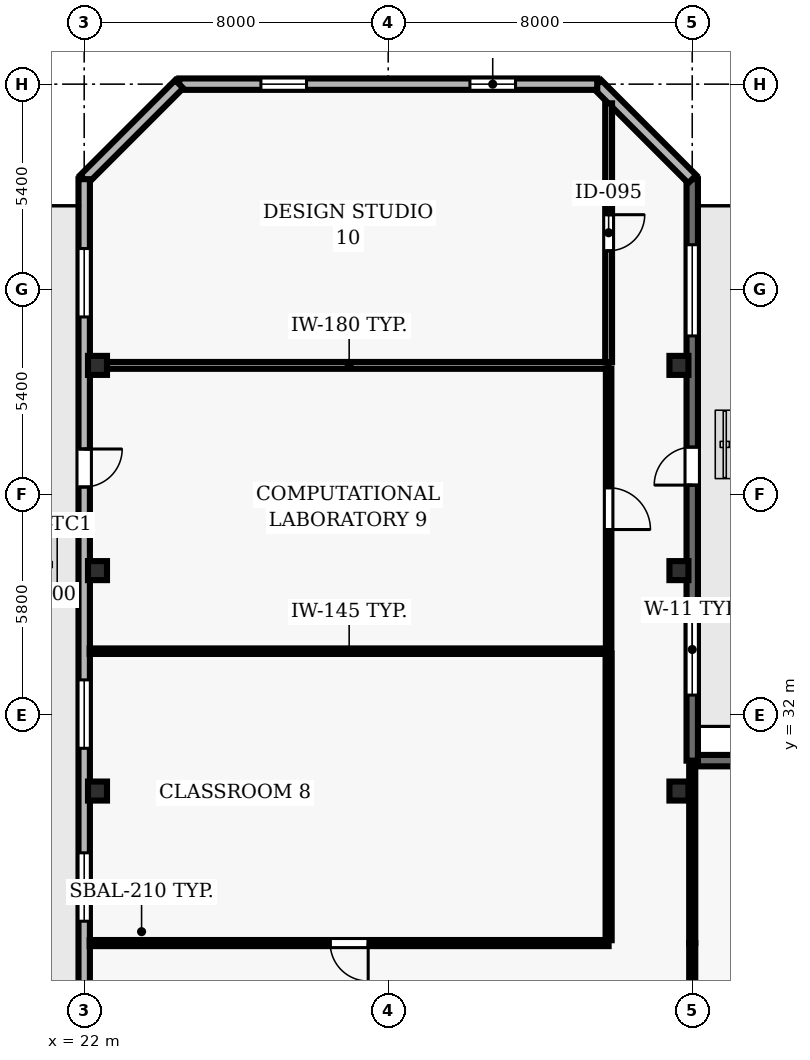
"""IFC4 building model, lengths in metres.
Left out: names, types, materials, properties, quantities, classifications, styles, units other than length and angle.
Written with IfcOpenShell. Run it as: python <this file> out.ifc"""

import sys

from ifc_helpers import new_model, si_unit, direction, frame, frame_2d, origin, origin_2d, place, context, subcontext, project, spatial, rectangle, hollow_rectangle, extrude, element, fill, save


model = new_model("IFC4")
c1 = context("Model", 3, precision=1e-05, world=origin(), true_north=direction((0.0, 1.0)))
c2 = subcontext(c1, "Body", "Model", "MODEL_VIEW")
j1 = project(units=[si_unit("LENGTHUNIT", "METRE"), si_unit("PLANEANGLEUNIT", "RADIAN")], contexts=[c1])
p1 = place(None, origin())
s1 = spatial("IfcSite", under=j1, at=p1, CompositionType="ELEMENT")
p2 = place(p1, origin())
s2 = spatial("IfcBuilding", under=s1, at=p2, CompositionType="ELEMENT")
p3 = place(p2, frame((0.0, 0.0, 111.2)))
s3 = spatial("IfcBuildingStorey", under=s2, at=p3, CompositionType="ELEMENT", Elevation=111.2)
for number, where, z_axis, x_axis in (
    (1, (22.35, 30.0, 0.0), (0.0, 0.0, 1.0), (1.0, 0.0, 0.0)),
    (2, (37.65, 30.0, 0.0), (0.0, 0.0, 1.0), (1.0, 0.0, 0.0)),
    (3, (22.35, 35.8, 0.0), (0.0, 0.0, 1.0), (1.0, 0.0, 0.0)),
    (4, (37.65, 35.8, 0.0), (0.0, 0.0, 1.0), (1.0, 0.0, 0.0)),
    (5, (22.35, 41.2, 0.0), (0.0, 0.0, 1.0), (1.0, 0.0, 0.0)),
    (6, (37.65, 41.2, 0.0), (0.0, 0.0, 1.0), (1.0, 0.0, 0.0)),
):
    element("IfcColumn", number, at=place(p3, frame(where, z_axis=z_axis, x_axis=x_axis)), inside=s3, PredefinedType="COLUMN", context=c2, shape_type="SweptSolid", body=[
        extrude(hollow_rectangle(XDim=0.5, YDim=0.5, WallThickness=0.025, at=origin_2d()), origin(), (0.0, 0.0, 1.0), 3.9),
    ])
p4 = place(p3, frame((47.456, 30.8, 0.0), z_axis=(0.0, 0.0, 1.0), x_axis=(-1.0, 0.0, 0.0)))
e7 = element("IfcWall", 7, at=p4, inside=s3, PredefinedType="SOLIDWALL", context=c2, shape_type="SweptSolid", body=[
    extrude(rectangle(XDim=9.456, YDim=0.3, at=frame_2d((4.728, 0.0))), origin(), (0.0, 0.0, 1.0), 3.69),
])
p5 = place(p4, frame((3.828, 0.0, 0.9)))
e8 = element("IfcOpeningElement", 8, at=p5, cuts=e7, PredefinedType="OPENING", context=c2, shape_type="SweptSolid", body=[
    extrude(rectangle(XDim=1.8, YDim=2.2, at=frame_2d((0.9, 1.1))), frame((0.0, 0.16, 0.0), z_axis=(0.0, -1.0, 0.0), x_axis=(1.0, 0.0, 0.0)), (0.0, 0.0, 1.0), 0.32),
])
p6 = place(p3, frame((38.0, 30.8, 0.0), z_axis=(0.0, 0.0, 1.0), x_axis=(0.0, 1.0, 0.0)))
e9 = element("IfcWall", 9, at=p6, inside=s3, PredefinedType="SOLIDWALL", context=c2, shape_type="SweptSolid", body=[
    extrude(rectangle(XDim=15.3, YDim=0.3, at=frame_2d((7.65, 0.0))), origin(), (0.0, 0.0, 1.0), 3.69),
])
p7 = place(p6, frame((7.25, 0.0, 0.0)))
e10 = element("IfcOpeningElement", 10, at=p7, cuts=e9, PredefinedType="OPENING", context=c2, shape_type="SweptSolid", body=[
    extrude(rectangle(XDim=1.0, YDim=2.2, at=frame_2d((0.5, 1.1))), frame((0.0, 0.16, 0.0), z_axis=(0.0, -1.0, 0.0), x_axis=(1.0, 0.0, 0.0)), (0.0, 0.0, 1.0), 0.32),
])
p8 = place(p6, frame((1.725, 0.0, 0.9)))
e11 = element("IfcOpeningElement", 11, at=p8, cuts=e9, PredefinedType="OPENING", context=c2, shape_type="SweptSolid", body=[
    extrude(rectangle(XDim=2.4, YDim=2.2, at=frame_2d((1.2, 1.1))), frame((0.0, 0.16, 0.0), z_axis=(0.0, -1.0, 0.0), x_axis=(1.0, 0.0, 0.0)), (0.0, 0.0, 1.0), 0.32),
])
p9 = place(p6, frame((11.175, 0.0, 0.9)))
e12 = element("IfcOpeningElement", 12, at=p9, cuts=e9, PredefinedType="OPENING", context=c2, shape_type="SweptSolid", body=[
    extrude(rectangle(XDim=2.4, YDim=2.2, at=frame_2d((1.2, 1.1))), frame((0.0, 0.16, 0.0), z_axis=(0.0, -1.0, 0.0), x_axis=(1.0, 0.0, 0.0)), (0.0, 0.0, 1.0), 0.32),
])
p10 = place(p3, frame((38.0, 46.1, 0.0), z_axis=(0.0, 0.0, 1.0), x_axis=(-0.707106781187, 0.707106781187, 0.0)))
e13 = element("IfcWall", 13, at=p10, inside=s3, PredefinedType="SOLIDWALL", context=c2, shape_type="SweptSolid", body=[
    extrude(rectangle(XDim=3.536, YDim=0.3, at=frame_2d((1.768, 0.0))), origin(), (0.0, 0.0, 1.0), 3.69),
])
p11 = place(p3, frame((35.5, 48.6, 0.0), z_axis=(0.0, 0.0, 1.0), x_axis=(-1.0, 0.0, 0.0)))
e14 = element("IfcWall", 14, at=p11, inside=s3, PredefinedType="SOLIDWALL", context=c2, shape_type="SweptSolid", body=[
    extrude(rectangle(XDim=11.0, YDim=0.3, at=frame_2d((5.5, 0.0))), origin(), (0.0, 0.0, 1.0), 3.69),
])
p12 = place(p11, frame((2.15, 0.0, 0.9)))
e15 = element("IfcOpeningElement", 15, at=p12, cuts=e14, PredefinedType="OPENING", context=c2, shape_type="SweptSolid", body=[
    extrude(rectangle(XDim=1.2, YDim=1.6, at=frame_2d((0.6, 0.8))), frame((0.0, 0.16, 0.0), z_axis=(0.0, -1.0, 0.0), x_axis=(1.0, 0.0, 0.0)), (0.0, 0.0, 1.0), 0.32),
])
p13 = place(p11, frame((7.65, 0.0, 0.9)))
e16 = element("IfcOpeningElement", 16, at=p13, cuts=e14, PredefinedType="OPENING", context=c2, shape_type="SweptSolid", body=[
    extrude(rectangle(XDim=1.2, YDim=1.6, at=frame_2d((0.6, 0.8))), frame((0.0, 0.16, 0.0), z_axis=(0.0, -1.0, 0.0), x_axis=(1.0, 0.0, 0.0)), (0.0, 0.0, 1.0), 0.32),
])
p14 = place(p3, frame((24.5, 48.6, 0.0), z_axis=(0.0, 0.0, 1.0), x_axis=(-0.707106781187, -0.707106781187, 0.0)))
e17 = element("IfcWall", 17, at=p14, inside=s3, PredefinedType="SOLIDWALL", context=c2, shape_type="SweptSolid", body=[
    extrude(rectangle(XDim=3.536, YDim=0.3, at=frame_2d((1.768, 0.0))), origin(), (0.0, 0.0, 1.0), 3.69),
])
p15 = place(p3, frame((22.0, 46.1, 0.0), z_axis=(0.0, 0.0, 1.0), x_axis=(0.0, -1.0, 0.0)))
e18 = element("IfcWall", 18, at=p15, inside=s3, PredefinedType="SOLIDWALL", context=c2, shape_type="SweptSolid", body=[
    extrude(rectangle(XDim=43.6, YDim=0.3, at=frame_2d((21.8, 0.0))), origin(), (0.0, 0.0, 1.0), 3.69),
])
p16 = place(p15, frame((7.1, 0.0, 0.0)))
e19 = element("IfcOpeningElement", 19, at=p16, cuts=e18, PredefinedType="OPENING", context=c2, shape_type="SweptSolid", body=[
    extrude(rectangle(XDim=1.0, YDim=2.2, at=frame_2d((0.5, 1.1))), frame((0.0, 0.16, 0.0), z_axis=(0.0, -1.0, 0.0), x_axis=(1.0, 0.0, 0.0)), (0.0, 0.0, 1.0), 0.32),
])
p17 = place(p15, frame((1.825, 0.0, 0.9)))
e20 = element("IfcOpeningElement", 20, at=p17, cuts=e18, PredefinedType="OPENING", context=c2, shape_type="SweptSolid", body=[
    extrude(rectangle(XDim=1.8, YDim=1.6, at=frame_2d((0.9, 0.8))), frame((0.0, 0.16, 0.0), z_axis=(0.0, -1.0, 0.0), x_axis=(1.0, 0.0, 0.0)), (0.0, 0.0, 1.0), 0.32),
])
p18 = place(p15, frame((13.175, 0.0, 0.9)))
e21 = element("IfcOpeningElement", 21, at=p18, cuts=e18, PredefinedType="OPENING", context=c2, shape_type="SweptSolid", body=[
    extrude(rectangle(XDim=1.8, YDim=1.6, at=frame_2d((0.9, 0.8))), frame((0.0, 0.16, 0.0), z_axis=(0.0, -1.0, 0.0), x_axis=(1.0, 0.0, 0.0)), (0.0, 0.0, 1.0), 0.32),
])
p19 = place(p15, frame((17.725, 0.0, 0.9)))
e22 = element("IfcOpeningElement", 22, at=p19, cuts=e18, PredefinedType="OPENING", context=c2, shape_type="SweptSolid", body=[
    extrude(rectangle(XDim=1.8, YDim=1.6, at=frame_2d((0.9, 0.8))), frame((0.0, 0.16, 0.0), z_axis=(0.0, -1.0, 0.0), x_axis=(1.0, 0.0, 0.0)), (0.0, 0.0, 1.0), 0.32),
])
p20 = place(p15, frame((23.625, 0.0, 0.9)))
e23 = element("IfcOpeningElement", 23, at=p20, cuts=e18, PredefinedType="OPENING", context=c2, shape_type="SweptSolid", body=[
    extrude(rectangle(XDim=1.8, YDim=1.6, at=frame_2d((0.9, 0.8))), frame((0.0, 0.16, 0.0), z_axis=(0.0, -1.0, 0.0), x_axis=(1.0, 0.0, 0.0)), (0.0, 0.0, 1.0), 0.32),
])
p21 = place(p15, frame((28.625, 0.0, 0.9)))
e24 = element("IfcOpeningElement", 24, at=p21, cuts=e18, PredefinedType="OPENING", context=c2, shape_type="SweptSolid", body=[
    extrude(rectangle(XDim=1.8, YDim=1.6, at=frame_2d((0.9, 0.8))), frame((0.0, 0.16, 0.0), z_axis=(0.0, -1.0, 0.0), x_axis=(1.0, 0.0, 0.0)), (0.0, 0.0, 1.0), 0.32),
])
p22 = place(p15, frame((34.525, 0.0, 0.9)))
e25 = element("IfcOpeningElement", 25, at=p22, cuts=e18, PredefinedType="OPENING", context=c2, shape_type="SweptSolid", body=[
    extrude(rectangle(XDim=1.8, YDim=1.6, at=frame_2d((0.9, 0.8))), frame((0.0, 0.16, 0.0), z_axis=(0.0, -1.0, 0.0), x_axis=(1.0, 0.0, 0.0)), (0.0, 0.0, 1.0), 0.32),
])
p23 = place(p3, frame((35.8, 26.0, 0.0), z_axis=(0.0, 0.0, 1.0), x_axis=(-1.0, 0.0, 0.0)))
e26 = element("IfcWall", 26, at=p23, inside=s3, PredefinedType="PARTITIONING", context=c2, shape_type="SweptSolid", body=[
    extrude(rectangle(XDim=13.655, YDim=0.16, at=frame_2d((6.828, 0.0))), origin(), (0.0, 0.0, 1.0), 3.69),
])
p24 = place(p23, frame((6.327, 0.0, 0.0)))
e27 = element("IfcOpeningElement", 27, at=p24, cuts=e26, PredefinedType="OPENING", context=c2, shape_type="SweptSolid", body=[
    extrude(rectangle(XDim=1.0, YDim=2.1, at=frame_2d((0.5, 1.05))), frame((0.0, 0.09, 0.0), z_axis=(0.0, -1.0, 0.0), x_axis=(1.0, 0.0, 0.0)), (0.0, 0.0, 1.0), 0.18),
])
p25 = place(p3, frame((35.8, 33.68, 0.0), z_axis=(0.0, 0.0, 1.0), x_axis=(-1.0, 0.0, 0.0)))
e28 = element("IfcWall", 28, at=p25, inside=s3, PredefinedType="PARTITIONING", context=c2, shape_type="SweptSolid", body=[
    extrude(rectangle(XDim=13.655, YDim=0.145, at=frame_2d((6.828, 0.0))), origin(), (0.0, 0.0, 1.0), 3.69),
])
p26 = place(p3, frame((35.8, 41.2, 0.0), z_axis=(0.0, 0.0, 1.0), x_axis=(-1.0, 0.0, 0.0)))
e29 = element("IfcWall", 29, at=p26, inside=s3, PredefinedType="PARTITIONING", context=c2, shape_type="SweptSolid", body=[
    extrude(rectangle(XDim=13.655, YDim=0.18, at=frame_2d((6.828, 0.0))), origin(), (0.0, 0.0, 1.0), 3.074),
])
p27 = place(p3, frame((35.8, 33.612, 0.0), z_axis=(0.0, 0.0, 1.0), x_axis=(0.0, -1.0, 0.0)))
e30 = element("IfcWall", 30, at=p27, inside=s3, PredefinedType="PARTITIONING", context=c2, shape_type="SweptSolid", body=[
    extrude(rectangle(XDim=7.537, YDim=0.16, at=frame_2d((3.769, 0.0))), origin(), (0.0, 0.0, 1.0), 3.69),
])
p28 = place(p3, frame((35.8, 41.115, 0.0), z_axis=(0.0, 0.0, 1.0), x_axis=(0.0, -1.0, 0.0)))
e31 = element("IfcWall", 31, at=p28, inside=s3, PredefinedType="PARTITIONING", context=c2, shape_type="SweptSolid", body=[
    extrude(rectangle(XDim=7.367, YDim=0.145, at=frame_2d((3.684, 0.0))), origin(), (0.0, 0.0, 1.0), 3.69),
])
p29 = place(p28, frame((3.134, 0.0, 0.0)))
e32 = element("IfcOpeningElement", 32, at=p29, cuts=e31, PredefinedType="OPENING", context=c2, shape_type="SweptSolid", body=[
    extrude(rectangle(XDim=1.1, YDim=2.15, at=frame_2d((0.55, 1.075))), frame((0.0, 0.083, 0.0), z_axis=(0.0, -1.0, 0.0), x_axis=(1.0, 0.0, 0.0)), (0.0, 0.0, 1.0), 0.165),
])
p30 = place(p3, frame((35.8, 48.095, 0.0), z_axis=(0.0, 0.0, 1.0), x_axis=(0.0, -1.0, 0.0)))
e33 = element("IfcWall", 33, at=p30, inside=s3, PredefinedType="PARTITIONING", context=c2, shape_type="SweptSolid", body=[
    extrude(rectangle(XDim=6.81, YDim=0.18, at=frame_2d((3.405, 0.0))), origin(), (0.0, 0.0, 1.0), 3.69),
])
p31 = place(p30, frame((2.93, 0.0, 0.0)))
e34 = element("IfcOpeningElement", 34, at=p31, cuts=e33, PredefinedType="OPENING", context=c2, shape_type="SweptSolid", body=[
    extrude(rectangle(XDim=0.95, YDim=2.1, at=frame_2d((0.475, 1.05))), frame((0.0, 0.1, 0.0), z_axis=(0.0, -1.0, 0.0), x_axis=(1.0, 0.0, 0.0)), (0.0, 0.0, 1.0), 0.2),
])
p32 = place(p3, frame((38.0, 23.85, 0.0), z_axis=(0.0, 0.0, 1.0), x_axis=(0.0, 1.0, 0.0)))
e35 = element("IfcWall", 35, at=p32, inside=s3, PredefinedType="PARTITIONING", context=c2, shape_type="SweptSolid", body=[
    extrude(rectangle(XDim=2.15, YDim=0.16, at=frame_2d((1.075, 0.0))), origin(), (0.0, 0.0, 1.0), 3.074),
])
p33 = place(p3, frame((38.0, 26.0, 0.0), z_axis=(0.0, 0.0, 1.0), x_axis=(0.0, 1.0, 0.0)))
e36 = element("IfcWall", 36, at=p33, inside=s3, PredefinedType="PARTITIONING", context=c2, shape_type="SweptSolid", body=[
    extrude(rectangle(XDim=4.655, YDim=0.16, at=frame_2d((2.328, 0.0))), origin(), (0.0, 0.0, 1.0), 3.074),
])
p34 = place(p7, origin())
e37 = element("IfcDoor", 37, at=p34, inside=s3, OperationType="SINGLE_SWING_LEFT", PredefinedType="DOOR", context=c2, shape_type="SweptSolid", body=[
    extrude(rectangle(XDim=1.0, YDim=2.2, at=frame_2d((0.5, 1.1))), frame((0.0, 0.025, 0.0), z_axis=(0.0, -1.0, 0.0), x_axis=(1.0, 0.0, 0.0)), (0.0, 0.0, 1.0), 0.05),
])
fill(e10, e37)
p35 = place(p8, origin())
e38 = element("IfcWindow", 38, at=p35, inside=s3, PartitioningType="SINGLE_PANEL", PredefinedType="WINDOW", context=c2, shape_type="SweptSolid", body=[
    extrude(rectangle(XDim=2.4, YDim=2.2, at=frame_2d((1.2, 1.1))), frame((0.0, 0.03, 0.0), z_axis=(0.0, -1.0, 0.0), x_axis=(1.0, 0.0, 0.0)), (0.0, 0.0, 1.0), 0.06),
])
fill(e11, e38)
p36 = place(p9, origin())
e39 = element("IfcWindow", 39, at=p36, inside=s3, PartitioningType="SINGLE_PANEL", PredefinedType="WINDOW", context=c2, shape_type="SweptSolid", body=[
    extrude(rectangle(XDim=2.4, YDim=2.2, at=frame_2d((1.2, 1.1))), frame((0.0, 0.03, 0.0), z_axis=(0.0, -1.0, 0.0), x_axis=(1.0, 0.0, 0.0)), (0.0, 0.0, 1.0), 0.06),
])
fill(e12, e39)
p37 = place(p12, origin())
e40 = element("IfcWindow", 40, at=p37, inside=s3, PartitioningType="SINGLE_PANEL", PredefinedType="WINDOW", context=c2, shape_type="SweptSolid", body=[
    extrude(rectangle(XDim=1.2, YDim=1.6, at=frame_2d((0.6, 0.8))), frame((0.0, 0.03, 0.0), z_axis=(0.0, -1.0, 0.0), x_axis=(1.0, 0.0, 0.0)), (0.0, 0.0, 1.0), 0.06),
])
fill(e15, e40)
p38 = place(p13, origin())
e41 = element("IfcWindow", 41, at=p38, inside=s3, PartitioningType="SINGLE_PANEL", PredefinedType="WINDOW", context=c2, shape_type="SweptSolid", body=[
    extrude(rectangle(XDim=1.2, YDim=1.6, at=frame_2d((0.6, 0.8))), frame((0.0, 0.03, 0.0), z_axis=(0.0, -1.0, 0.0), x_axis=(1.0, 0.0, 0.0)), (0.0, 0.0, 1.0), 0.06),
])
fill(e16, e41)
p39 = place(p16, origin())
e42 = element("IfcDoor", 42, at=p39, inside=s3, OperationType="SINGLE_SWING_LEFT", PredefinedType="DOOR", context=c2, shape_type="SweptSolid", body=[
    extrude(rectangle(XDim=1.0, YDim=2.2, at=frame_2d((0.5, 1.1))), frame((0.0, 0.025, 0.0), z_axis=(0.0, -1.0, 0.0), x_axis=(1.0, 0.0, 0.0)), (0.0, 0.0, 1.0), 0.05),
])
fill(e19, e42)
p40 = place(p17, origin())
e43 = element("IfcWindow", 43, at=p40, inside=s3, PartitioningType="SINGLE_PANEL", PredefinedType="WINDOW", context=c2, shape_type="SweptSolid", body=[
    extrude(rectangle(XDim=1.8, YDim=1.6, at=frame_2d((0.9, 0.8))), frame((0.0, 0.03, 0.0), z_axis=(0.0, -1.0, 0.0), x_axis=(1.0, 0.0, 0.0)), (0.0, 0.0, 1.0), 0.06),
])
fill(e20, e43)
p41 = place(p18, origin())
e44 = element("IfcWindow", 44, at=p41, inside=s3, PartitioningType="SINGLE_PANEL", PredefinedType="WINDOW", context=c2, shape_type="SweptSolid", body=[
    extrude(rectangle(XDim=1.8, YDim=1.6, at=frame_2d((0.9, 0.8))), frame((0.0, 0.03, 0.0), z_axis=(0.0, -1.0, 0.0), x_axis=(1.0, 0.0, 0.0)), (0.0, 0.0, 1.0), 0.06),
])
fill(e21, e44)
p42 = place(p19, origin())
e45 = element("IfcWindow", 45, at=p42, inside=s3, PartitioningType="SINGLE_PANEL", PredefinedType="WINDOW", context=c2, shape_type="SweptSolid", body=[
    extrude(rectangle(XDim=1.8, YDim=1.6, at=frame_2d((0.9, 0.8))), frame((0.0, 0.03, 0.0), z_axis=(0.0, -1.0, 0.0), x_axis=(1.0, 0.0, 0.0)), (0.0, 0.0, 1.0), 0.06),
])
fill(e22, e45)
p43 = place(p24, origin())
e46 = element("IfcDoor", 46, at=p43, inside=s3, OperationType="SINGLE_SWING_LEFT", PredefinedType="DOOR", context=c2, shape_type="SweptSolid", body=[
    extrude(rectangle(XDim=1.0, YDim=2.1, at=frame_2d((0.5, 1.05))), frame((0.0, 0.025, 0.0), z_axis=(0.0, -1.0, 0.0), x_axis=(1.0, 0.0, 0.0)), (0.0, 0.0, 1.0), 0.05),
])
fill(e27, e46)
p44 = place(p29, origin())
e47 = element("IfcDoor", 47, at=p44, inside=s3, OperationType="SINGLE_SWING_RIGHT", PredefinedType="DOOR", context=c2, shape_type="SweptSolid", body=[
    extrude(rectangle(XDim=1.1, YDim=2.15, at=frame_2d((0.55, 1.075))), frame((0.0, 0.025, 0.0), z_axis=(0.0, -1.0, 0.0), x_axis=(1.0, 0.0, 0.0)), (0.0, 0.0, 1.0), 0.05),
])
fill(e32, e47)
p45 = place(p31, origin())
e48 = element("IfcDoor", 48, at=p45, inside=s3, OperationType="SINGLE_SWING_LEFT", PredefinedType="DOOR", context=c2, shape_type="SweptSolid", body=[
    extrude(rectangle(XDim=0.95, YDim=2.1, at=frame_2d((0.475, 1.05))), frame((0.0, 0.025, 0.0), z_axis=(0.0, -1.0, 0.0), x_axis=(1.0, 0.0, 0.0)), (0.0, 0.0, 1.0), 0.05),
])
fill(e34, e48)
save(model, sys.argv[1])
